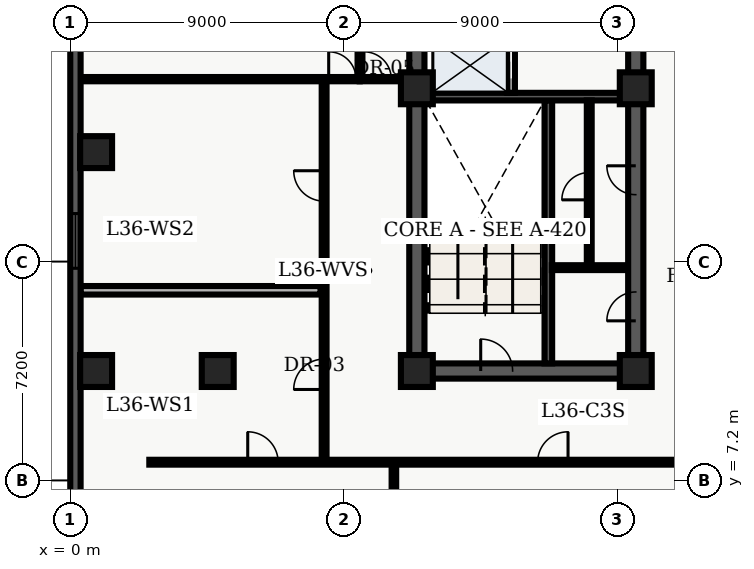
"""IFC4 building model, lengths in metres.
Left out: names, types, materials, properties, quantities, classifications, styles, units other than length and angle.
Written with IfcOpenShell. Run it as: python <this file> out.ifc"""

import sys

from ifc_helpers import new_model, entity, si_unit, converted_unit, direction, frame, origin_with_axes, origin_2d_with_axis, place, context, subcontext, project, spatial, polyline, rectangle, outline, extrude, element, fill, save


model = new_model("IFC4")
c1 = context("Model", 3, precision=1e-05, world=origin_with_axes(), true_north=direction((0.0, 1.0)))
c2 = subcontext(c1, "Body", "Model", "MODEL_VIEW")
j1 = project(units=[si_unit("LENGTHUNIT", "METRE"), converted_unit("PLANEANGLEUNIT", "DEGREE", entity("IfcPlaneAngleMeasure", 0.017), si_unit("PLANEANGLEUNIT", "RADIAN"), dimensions=[0, 0, 0, 0, 0, 0, 0])], contexts=[c1])
p1 = place(None, origin_with_axes())
s1 = spatial("IfcSite", under=j1, at=p1, CompositionType="ELEMENT")
p2 = place(p1, origin_with_axes())
s2 = spatial("IfcBuilding", under=s1, at=p2, CompositionType="ELEMENT")
p3 = place(p2, frame((0.0, 0.0, 148.5), z_axis=(0.0, 0.0, 1.0), x_axis=(1.0, 0.0, 0.0)))
s3 = spatial("IfcBuildingStorey", under=s2, at=p3, CompositionType="ELEMENT", Elevation=148.5)
p4 = place(p3, frame((11.4, 10.8, 0.0), z_axis=(0.0, 0.0, 1.0), x_axis=(0.0, 1.0, 0.0)))
e1 = element("IfcWall", 1, at=p4, inside=s3, PredefinedType="SHEAR", context=c2, shape_type="SweptSolid", body=[
    extrude(outline(polyline([(0.0, -0.25), (27.0, -0.25), (27.0, 0.25), (0.0, 0.25), (0.0, -0.25)])), origin_with_axes(), (0.0, 0.0, 1.0), 3.66),
])
p5 = place(p3, frame((11.4, 10.8, 0.0), z_axis=(0.0, 0.0, 1.0), x_axis=(1.0, 0.0, 0.0)))
e2 = element("IfcWall", 2, at=p5, inside=s3, PredefinedType="SHEAR", context=c2, shape_type="SweptSolid", body=[
    extrude(outline(polyline([(0.0, -0.25), (7.2, -0.25), (7.2, 0.25), (0.0, 0.25), (0.0, -0.25)])), origin_with_axes(), (0.0, 0.0, 1.0), 3.66),
])
p6 = place(p5, frame((2.625, 0.0, 0.0), z_axis=(0.0, 0.0, 1.0), x_axis=(1.0, 0.0, 0.0)))
e3 = element("IfcOpeningElement", 3, at=p6, cuts=e2, PredefinedType="OPENING", context=c2, shape_type="SweptSolid", body=[
    extrude(rectangle(XDim=1.05, YDim=0.52, at=origin_2d_with_axis()), origin_with_axes(), (0.0, 0.0, 1.0), 2.15),
])
p7 = place(p3, frame((18.6, 10.8, 0.0), z_axis=(0.0, 0.0, 1.0), x_axis=(0.0, 1.0, 0.0)))
e4 = element("IfcWall", 4, at=p7, inside=s3, PredefinedType="SHEAR", context=c2, shape_type="SweptSolid", body=[
    extrude(outline(polyline([(0.0, -0.25), (13.5, -0.25), (13.5, 0.25), (0.0, 0.25), (0.0, -0.25)])), origin_with_axes(), (0.0, 0.0, 1.0), 3.66),
])
p8 = place(p7, frame((11.125, 0.0, 0.0), z_axis=(0.0, 0.0, 1.0), x_axis=(1.0, 0.0, 0.0)))
e5 = element("IfcOpeningElement", 5, at=p8, cuts=e4, PredefinedType="OPENING", context=c2, shape_type="SweptSolid", body=[
    extrude(rectangle(XDim=1.05, YDim=0.52, at=origin_2d_with_axis()), origin_with_axes(), (0.0, 0.0, 1.0), 2.15),
])
p9 = place(p7, frame((2.125, 0.0, 0.0), z_axis=(0.0, 0.0, 1.0), x_axis=(1.0, 0.0, 0.0)))
e6 = element("IfcOpeningElement", 6, at=p9, cuts=e4, PredefinedType="OPENING", context=c2, shape_type="SweptSolid", body=[
    extrude(rectangle(XDim=0.95, YDim=0.52, at=origin_2d_with_axis()), origin_with_axes(), (0.0, 0.0, 1.0), 2.15),
])
p10 = place(p7, frame((6.275, 0.0, 0.0), z_axis=(0.0, 0.0, 1.0), x_axis=(1.0, 0.0, 0.0)))
e7 = element("IfcOpeningElement", 7, at=p10, cuts=e4, PredefinedType="OPENING", context=c2, shape_type="SweptSolid", body=[
    extrude(rectangle(XDim=0.95, YDim=0.52, at=origin_2d_with_axis()), origin_with_axes(), (0.0, 0.0, 1.0), 2.15),
])
p11 = place(p3, frame((15.725, 11.05, 0.0), z_axis=(0.0, 0.0, 1.0), x_axis=(0.0, 1.0, 0.0)))
e8 = element("IfcWall", 8, at=p11, inside=s3, PredefinedType="SHEAR", context=c2, shape_type="SweptSolid", body=[
    extrude(outline(polyline([(0.0, -0.125), (8.65, -0.125), (8.65, 0.125), (0.0, 0.125), (0.0, -0.125)])), origin_with_axes(), (0.0, 0.0, 1.0), 3.66),
])
p12 = place(p3, frame((11.65, 19.825, 0.0), z_axis=(0.0, 0.0, 1.0), x_axis=(1.0, 0.0, 0.0)))
e9 = element("IfcWall", 9, at=p12, inside=s3, PredefinedType="SHEAR", context=c2, shape_type="SweptSolid", body=[
    extrude(outline(polyline([(0.0, -0.125), (6.7, -0.125), (6.7, 0.125), (0.0, 0.125), (0.0, -0.125)])), origin_with_axes(), (0.0, 0.0, 1.0), 3.66),
])
p13 = place(p3, frame((14.5, 19.95, 0.0), z_axis=(0.0, 0.0, 1.0), x_axis=(0.0, 1.0, 0.0)))
e10 = element("IfcWall", 10, at=p13, inside=s3, PredefinedType="SOLIDWALL", context=c2, shape_type="SweptSolid", body=[
    extrude(outline(polyline([(0.0, -0.125), (6.25, -0.125), (6.25, 0.125), (0.0, 0.125), (0.0, -0.125)])), origin_with_axes(), (0.0, 0.0, 1.0), 2.7),
])
p14 = place(p13, frame((1.025, 0.0, 0.0), z_axis=(0.0, 0.0, 1.0), x_axis=(1.0, 0.0, 0.0)))
e11 = element("IfcOpeningElement", 11, at=p14, cuts=e10, PredefinedType="OPENING", context=c2, shape_type="SweptSolid", body=[
    extrude(rectangle(XDim=1.1, YDim=0.27, at=origin_2d_with_axis()), origin_with_axes(), (0.0, 0.0, 1.0), 2.15),
])
p15 = place(p13, frame((2.975, 0.0, 0.0), z_axis=(0.0, 0.0, 1.0), x_axis=(1.0, 0.0, 0.0)))
e12 = element("IfcOpeningElement", 12, at=p15, cuts=e10, PredefinedType="OPENING", context=c2, shape_type="SweptSolid", body=[
    extrude(rectangle(XDim=1.1, YDim=0.27, at=origin_2d_with_axis()), origin_with_axes(), (0.0, 0.0, 1.0), 2.15),
])
p16 = place(p13, frame((5.425, 0.0, 0.0), z_axis=(0.0, 0.0, 1.0), x_axis=(1.0, 0.0, 0.0)))
e13 = element("IfcOpeningElement", 13, at=p16, cuts=e10, PredefinedType="OPENING", context=c2, shape_type="SweptSolid", body=[
    extrude(rectangle(XDim=1.2, YDim=0.27, at=origin_2d_with_axis()), origin_with_axes(), (0.0, 0.0, 1.0), 2.15),
])
for number, where, z_axis, x_axis in (
    (14, (11.4, 10.8, 0.0), (0.0, 0.0, 1.0), (1.0, 0.0, 0.0)),
    (15, (11.4, 20.1, 0.0), (0.0, 0.0, 1.0), (1.0, 0.0, 0.0)),
    (16, (18.6, 10.8, 0.0), (0.0, 0.0, 1.0), (1.0, 0.0, 0.0)),
    (17, (18.6, 20.1, 0.0), (0.0, 0.0, 1.0), (1.0, 0.0, 0.0)),
    (18, (4.85, 10.8, 0.0), (0.0, 0.0, 1.0), (1.0, 0.0, 0.0)),
    (19, (0.85, 10.8, 0.0), (0.0, 0.0, 1.0), (1.0, 0.0, 0.0)),
    (20, (0.85, 18.0, 0.0), (0.0, 0.0, 1.0), (1.0, 0.0, 0.0)),
):
    element("IfcColumn", number, at=place(p3, frame(where, z_axis=z_axis, x_axis=x_axis)), inside=s3, PredefinedType="COLUMN", context=c2, shape_type="SweptSolid", body=[
        extrude(rectangle(XDim=1.05, YDim=1.05, at=origin_2d_with_axis()), origin_with_axes(), (0.0, 0.0, 1.0), 3.9),
    ])
p17 = place(p3, frame((15.84, 14.2, 0.0), z_axis=(0.0, 0.0, 1.0), x_axis=(1.0, 0.0, 0.0)))
e21 = element("IfcWall", 21, at=p17, inside=s3, PredefinedType="PARTITIONING", context=c2, shape_type="SweptSolid", body=[
    extrude(outline(polyline([(0.0, -0.08), (2.46, -0.08), (2.46, 0.08), (0.0, 0.08), (0.0, -0.08)])), origin_with_axes(), (0.0, 0.0, 1.0), 2.7),
])
p18 = place(p3, frame((17.07, 14.28, 0.0), z_axis=(0.0, 0.0, 1.0), x_axis=(0.0, 1.0, 0.0)))
e22 = element("IfcWall", 22, at=p18, inside=s3, PredefinedType="PARTITIONING", context=c2, shape_type="SweptSolid", body=[
    extrude(outline(polyline([(0.0, -0.08), (5.42, -0.08), (5.42, 0.08), (0.0, 0.08), (0.0, -0.08)])), origin_with_axes(), (0.0, 0.0, 1.0), 2.7),
])
p19 = place(p18, frame((2.6, 0.0, 0.0), z_axis=(0.0, 0.0, 1.0), x_axis=(1.0, 0.0, 0.0)))
e23 = element("IfcOpeningElement", 23, at=p19, cuts=e22, PredefinedType="OPENING", context=c2, shape_type="SweptSolid", body=[
    extrude(rectangle(XDim=0.9, YDim=0.18, at=origin_2d_with_axis()), origin_with_axes(), (0.0, 0.0, 1.0), 2.15),
])
p20 = place(p3, frame((9.52, 20.4, 0.0), z_axis=(0.0, 0.0, 1.0), x_axis=(0.0, 1.0, 0.0)))
e24 = element("IfcWall", 24, at=p20, inside=s3, PredefinedType="PARTITIONING", context=c2, shape_type="SweptSolid", body=[
    extrude(outline(polyline([(0.0, -0.07), (4.0, -0.07), (4.0, 0.07), (0.0, 0.07), (0.0, -0.07)])), origin_with_axes(), (0.0, 0.0, 1.0), 2.7),
])
p21 = place(p3, frame((9.52, 20.4, 0.0), z_axis=(0.0, 0.0, 1.0), x_axis=(1.0, 0.0, 0.0)))
e25 = element("IfcWall", 25, at=p21, inside=s3, PredefinedType="PARTITIONING", context=c2, shape_type="SweptSolid", body=[
    extrude(outline(polyline([(0.0, -0.07), (1.58, -0.07), (1.58, 0.07), (0.0, 0.07), (0.0, -0.07)])), origin_with_axes(), (0.0, 0.0, 1.0), 2.7),
])
p22 = place(p21, frame((0.59, 0.0, 0.0), z_axis=(0.0, 0.0, 1.0), x_axis=(1.0, 0.0, 0.0)))
e26 = element("IfcOpeningElement", 26, at=p22, cuts=e25, PredefinedType="OPENING", context=c2, shape_type="SweptSolid", body=[
    extrude(rectangle(XDim=0.9, YDim=0.16, at=origin_2d_with_axis()), origin_with_axes(), (0.0, 0.0, 1.0), 2.15),
])
p23 = place(p3, frame((2.6, 7.8, 0.0), z_axis=(0.0, 0.0, 1.0), x_axis=(1.0, 0.0, 0.0)))
e27 = element("IfcWall", 27, at=p23, inside=s3, PredefinedType="PARTITIONING", context=c2, shape_type="SweptSolid", body=[
    extrude(outline(polyline([(0.0, -0.08), (18.55, -0.08), (18.55, 0.08), (0.0, 0.08), (0.0, -0.08)])), origin_with_axes(), (0.0, 0.0, 1.0), 2.7),
])
p24 = place(p23, frame((3.737, 0.0, 0.0), z_axis=(0.0, 0.0, 1.0), x_axis=(1.0, 0.0, 0.0)))
e28 = element("IfcOpeningElement", 28, at=p24, cuts=e27, PredefinedType="OPENING", context=c2, shape_type="SweptSolid", body=[
    extrude(rectangle(XDim=1.0, YDim=0.18, at=origin_2d_with_axis()), origin_with_axes(), (0.0, 0.0, 1.0), 2.15),
])
p25 = place(p23, frame((13.273, 0.0, 0.0), z_axis=(0.0, 0.0, 1.0), x_axis=(1.0, 0.0, 0.0)))
e29 = element("IfcOpeningElement", 29, at=p25, cuts=e27, PredefinedType="OPENING", context=c2, shape_type="SweptSolid", body=[
    extrude(rectangle(XDim=1.0, YDim=0.18, at=origin_2d_with_axis()), origin_with_axes(), (0.0, 0.0, 1.0), 2.15),
])
p26 = place(p3, frame((8.35, 7.8, 0.0), z_axis=(0.0, 0.0, 1.0), x_axis=(0.0, 1.0, 0.0)))
e30 = element("IfcWall", 30, at=p26, inside=s3, PredefinedType="PARTITIONING", context=c2, shape_type="SweptSolid", body=[
    extrude(outline(polyline([(0.0, -0.08), (12.6, -0.08), (12.6, 0.08), (0.0, 0.08), (0.0, -0.08)])), origin_with_axes(), (0.0, 0.0, 1.0), 2.7),
])
p27 = place(p26, frame((2.893, 0.0, 0.0), z_axis=(0.0, 0.0, 1.0), x_axis=(1.0, 0.0, 0.0)))
e31 = element("IfcOpeningElement", 31, at=p27, cuts=e30, PredefinedType="OPENING", context=c2, shape_type="SweptSolid", body=[
    extrude(rectangle(XDim=1.0, YDim=0.18, at=origin_2d_with_axis()), origin_with_axes(), (0.0, 0.0, 1.0), 2.15),
])
p28 = place(p26, frame((9.088, 0.0, 0.0), z_axis=(0.0, 0.0, 1.0), x_axis=(1.0, 0.0, 0.0)))
e32 = element("IfcOpeningElement", 32, at=p28, cuts=e30, PredefinedType="OPENING", context=c2, shape_type="SweptSolid", body=[
    extrude(rectangle(XDim=1.0, YDim=0.18, at=origin_2d_with_axis()), origin_with_axes(), (0.0, 0.0, 1.0), 2.15),
])
p29 = place(p3, frame((0.335, 20.4, 0.0), z_axis=(0.0, 0.0, 1.0), x_axis=(1.0, 0.0, 0.0)))
e33 = element("IfcWall", 33, at=p29, inside=s3, PredefinedType="PARTITIONING", context=c2, shape_type="SweptSolid", body=[
    extrude(outline(polyline([(0.0, -0.07), (9.185, -0.07), (9.185, 0.07), (0.0, 0.07), (0.0, -0.07)])), origin_with_axes(), (0.0, 0.0, 1.0), 2.7),
])
p30 = place(p29, frame((8.615, 0.0, 0.0), z_axis=(0.0, 0.0, 1.0), x_axis=(1.0, 0.0, 0.0)))
e34 = element("IfcOpeningElement", 34, at=p30, cuts=e33, PredefinedType="OPENING", context=c2, shape_type="SweptSolid", body=[
    extrude(rectangle(XDim=0.9, YDim=0.16, at=origin_2d_with_axis()), origin_with_axes(), (0.0, 0.0, 1.0), 2.15),
])
p31 = place(p3, frame((0.335, 13.455, 0.0), z_axis=(0.0, 0.0, 1.0), x_axis=(1.0, 0.0, 0.0)))
e35 = element("IfcWall", 35, at=p31, inside=s3, PredefinedType="PARTITIONING", context=c2, shape_type="SweptSolid", body=[
    extrude(outline(polyline([(0.0, -0.14), (7.895, -0.14), (7.895, 0.14), (0.0, 0.14), (0.0, -0.14)])), origin_with_axes(), (0.0, 0.0, 1.0), 2.7),
])
p32 = place(p3, frame((10.645, 0.335, 0.0), z_axis=(0.0, 0.0, 1.0), x_axis=(0.0, 1.0, 0.0)))
e36 = element("IfcWall", 36, at=p32, inside=s3, PredefinedType="PARTITIONING", context=c2, shape_type="SweptSolid", body=[
    extrude(outline(polyline([(0.0, -0.075), (7.365, -0.075), (7.365, 0.075), (0.0, 0.075), (0.0, -0.075)])), origin_with_axes(), (0.0, 0.0, 1.0), 2.7),
])
p33 = place(p3, frame((0.17, 2.74, 0.0), z_axis=(0.0, 0.0, 1.0), x_axis=(0.0, 1.0, 0.0)))
e37 = element("IfcWall", 37, at=p33, inside=s3, PredefinedType="SOLIDWALL", context=c2, shape_type="SweptSolid", body=[
    extrude(outline(polyline([(0.0, -0.17), (43.46, -0.17), (43.46, 0.17), (0.0, 0.17), (0.0, -0.17)])), origin_with_axes(), (0.0, 0.0, 1.0), 3.66),
])
p34 = place(p33, frame((2.948, 0.0, 0.45), z_axis=(0.0, 0.0, 1.0), x_axis=(1.0, 0.0, 0.0)))
e38 = element("IfcOpeningElement", 38, at=p34, cuts=e37, PredefinedType="OPENING", context=c2, shape_type="SweptSolid", body=[
    extrude(rectangle(XDim=1.8, YDim=0.36, at=origin_2d_with_axis()), origin_with_axes(), (0.0, 0.0, 1.0), 2.1),
])
p35 = place(p33, frame((12.339, 0.0, 0.45), z_axis=(0.0, 0.0, 1.0), x_axis=(1.0, 0.0, 0.0)))
e39 = element("IfcOpeningElement", 39, at=p35, cuts=e37, PredefinedType="OPENING", context=c2, shape_type="SweptSolid", body=[
    extrude(rectangle(XDim=1.8, YDim=0.36, at=origin_2d_with_axis()), origin_with_axes(), (0.0, 0.0, 1.0), 2.1),
])
p36 = place(p33, frame((26.426, 0.0, 0.45), z_axis=(0.0, 0.0, 1.0), x_axis=(1.0, 0.0, 0.0)))
e40 = element("IfcOpeningElement", 40, at=p36, cuts=e37, PredefinedType="OPENING", context=c2, shape_type="SweptSolid", body=[
    extrude(rectangle(XDim=1.8, YDim=0.36, at=origin_2d_with_axis()), origin_with_axes(), (0.0, 0.0, 1.0), 2.1),
])
p37 = place(p33, frame((31.121, 0.0, 0.45), z_axis=(0.0, 0.0, 1.0), x_axis=(1.0, 0.0, 0.0)))
e41 = element("IfcOpeningElement", 41, at=p37, cuts=e37, PredefinedType="OPENING", context=c2, shape_type="SweptSolid", body=[
    extrude(rectangle(XDim=1.8, YDim=0.36, at=origin_2d_with_axis()), origin_with_axes(), (0.0, 0.0, 1.0), 2.1),
])
p38 = place(p33, frame((40.062, 0.0, 0.45), z_axis=(0.0, 0.0, 1.0), x_axis=(1.0, 0.0, 0.0)))
e42 = element("IfcOpeningElement", 42, at=p38, cuts=e37, PredefinedType="OPENING", context=c2, shape_type="SweptSolid", body=[
    extrude(rectangle(XDim=1.8, YDim=0.36, at=origin_2d_with_axis()), origin_with_axes(), (0.0, 0.0, 1.0), 2.1),
])
p39 = place(p13, frame((1.025, 0.0, 0.0), z_axis=(0.0, 0.0, 1.0), x_axis=(1.0, 0.0, 0.0)))
e43 = element("IfcDoor", 43, at=p39, inside=s3, OperationType="SLIDING_TO_LEFT", PredefinedType="DOOR", context=c2, shape_type="SweptSolid", body=[
    extrude(rectangle(XDim=1.1, YDim=0.09, at=origin_2d_with_axis()), origin_with_axes(), (0.0, 0.0, 1.0), 2.15),
])
fill(e11, e43)
p40 = place(p5, frame((2.625, 0.0, 0.0), z_axis=(0.0, 0.0, 1.0), x_axis=(1.0, 0.0, 0.0)))
e44 = element("IfcDoor", 44, at=p40, inside=s3, OperationType="SINGLE_SWING_LEFT", PredefinedType="DOOR", context=c2, shape_type="SweptSolid", body=[
    extrude(rectangle(XDim=1.05, YDim=0.09, at=origin_2d_with_axis()), origin_with_axes(), (0.0, 0.0, 1.0), 2.15),
])
fill(e3, e44)
p41 = place(p7, frame((2.125, 0.0, 0.0), z_axis=(0.0, 0.0, 1.0), x_axis=(1.0, 0.0, 0.0)))
e45 = element("IfcDoor", 45, at=p41, inside=s3, OperationType="SINGLE_SWING_LEFT", PredefinedType="DOOR", context=c2, shape_type="SweptSolid", body=[
    extrude(rectangle(XDim=0.95, YDim=0.09, at=origin_2d_with_axis()), origin_with_axes(), (0.0, 0.0, 1.0), 2.15),
])
fill(e6, e45)
p42 = place(p18, frame((2.6, 0.0, 0.0), z_axis=(0.0, 0.0, 1.0), x_axis=(1.0, 0.0, 0.0)))
e46 = element("IfcDoor", 46, at=p42, inside=s3, OperationType="SINGLE_SWING_LEFT", PredefinedType="DOOR", context=c2, shape_type="SweptSolid", body=[
    extrude(rectangle(XDim=0.9, YDim=0.09, at=origin_2d_with_axis()), origin_with_axes(), (0.0, 0.0, 1.0), 2.15),
])
fill(e23, e46)
p43 = place(p7, frame((6.275, 0.0, 0.0), z_axis=(0.0, 0.0, 1.0), x_axis=(1.0, 0.0, 0.0)))
e47 = element("IfcDoor", 47, at=p43, inside=s3, OperationType="SINGLE_SWING_RIGHT", PredefinedType="DOOR", context=c2, shape_type="SweptSolid", body=[
    extrude(rectangle(XDim=0.95, YDim=0.09, at=origin_2d_with_axis()), origin_with_axes(), (0.0, 0.0, 1.0), 2.15),
])
fill(e7, e47)
p44 = place(p21, frame((0.59, 0.0, 0.0), z_axis=(0.0, 0.0, 1.0), x_axis=(1.0, 0.0, 0.0)))
e48 = element("IfcDoor", 48, at=p44, inside=s3, OperationType="SINGLE_SWING_LEFT", PredefinedType="DOOR", context=c2, shape_type="SweptSolid", body=[
    extrude(rectangle(XDim=0.9, YDim=0.084, at=origin_2d_with_axis()), origin_with_axes(), (0.0, 0.0, 1.0), 2.15),
])
fill(e26, e48)
p45 = place(p29, frame((8.615, 0.0, 0.0), z_axis=(0.0, 0.0, 1.0), x_axis=(1.0, 0.0, 0.0)))
e49 = element("IfcDoor", 49, at=p45, inside=s3, OperationType="SINGLE_SWING_LEFT", PredefinedType="DOOR", context=c2, shape_type="SweptSolid", body=[
    extrude(rectangle(XDim=0.9, YDim=0.084, at=origin_2d_with_axis()), origin_with_axes(), (0.0, 0.0, 1.0), 2.15),
])
fill(e34, e49)
p46 = place(p26, frame((2.893, 0.0, 0.0), z_axis=(0.0, 0.0, 1.0), x_axis=(1.0, 0.0, 0.0)))
e50 = element("IfcDoor", 50, at=p46, inside=s3, OperationType="SINGLE_SWING_LEFT", PredefinedType="DOOR", context=c2, shape_type="SweptSolid", body=[
    extrude(rectangle(XDim=1.0, YDim=0.09, at=origin_2d_with_axis()), origin_with_axes(), (0.0, 0.0, 1.0), 2.15),
])
fill(e31, e50)
p47 = place(p26, frame((9.088, 0.0, 0.0), z_axis=(0.0, 0.0, 1.0), x_axis=(1.0, 0.0, 0.0)))
e51 = element("IfcDoor", 51, at=p47, inside=s3, OperationType="SINGLE_SWING_RIGHT", PredefinedType="DOOR", context=c2, shape_type="SweptSolid", body=[
    extrude(rectangle(XDim=1.0, YDim=0.09, at=origin_2d_with_axis()), origin_with_axes(), (0.0, 0.0, 1.0), 2.15),
])
fill(e32, e51)
p48 = place(p23, frame((3.737, 0.0, 0.0), z_axis=(0.0, 0.0, 1.0), x_axis=(1.0, 0.0, 0.0)))
e52 = element("IfcDoor", 52, at=p48, inside=s3, OperationType="SINGLE_SWING_LEFT", PredefinedType="DOOR", context=c2, shape_type="SweptSolid", body=[
    extrude(rectangle(XDim=1.0, YDim=0.09, at=origin_2d_with_axis()), origin_with_axes(), (0.0, 0.0, 1.0), 2.15),
])
fill(e28, e52)
p49 = place(p23, frame((13.273, 0.0, 0.0), z_axis=(0.0, 0.0, 1.0), x_axis=(1.0, 0.0, 0.0)))
e53 = element("IfcDoor", 53, at=p49, inside=s3, OperationType="SINGLE_SWING_RIGHT", PredefinedType="DOOR", context=c2, shape_type="SweptSolid", body=[
    extrude(rectangle(XDim=1.0, YDim=0.09, at=origin_2d_with_axis()), origin_with_axes(), (0.0, 0.0, 1.0), 2.15),
])
fill(e29, e53)
p50 = place(p33, frame((12.339, 0.0, 0.45), z_axis=(0.0, 0.0, 1.0), x_axis=(1.0, 0.0, 0.0)))
e54 = element("IfcWindow", 54, at=p50, inside=s3, PredefinedType="WINDOW", context=c2, shape_type="SweptSolid", body=[
    extrude(rectangle(XDim=1.8, YDim=0.09, at=origin_2d_with_axis()), origin_with_axes(), (0.0, 0.0, 1.0), 2.1),
])
fill(e39, e54)
save(model, sys.argv[1])
